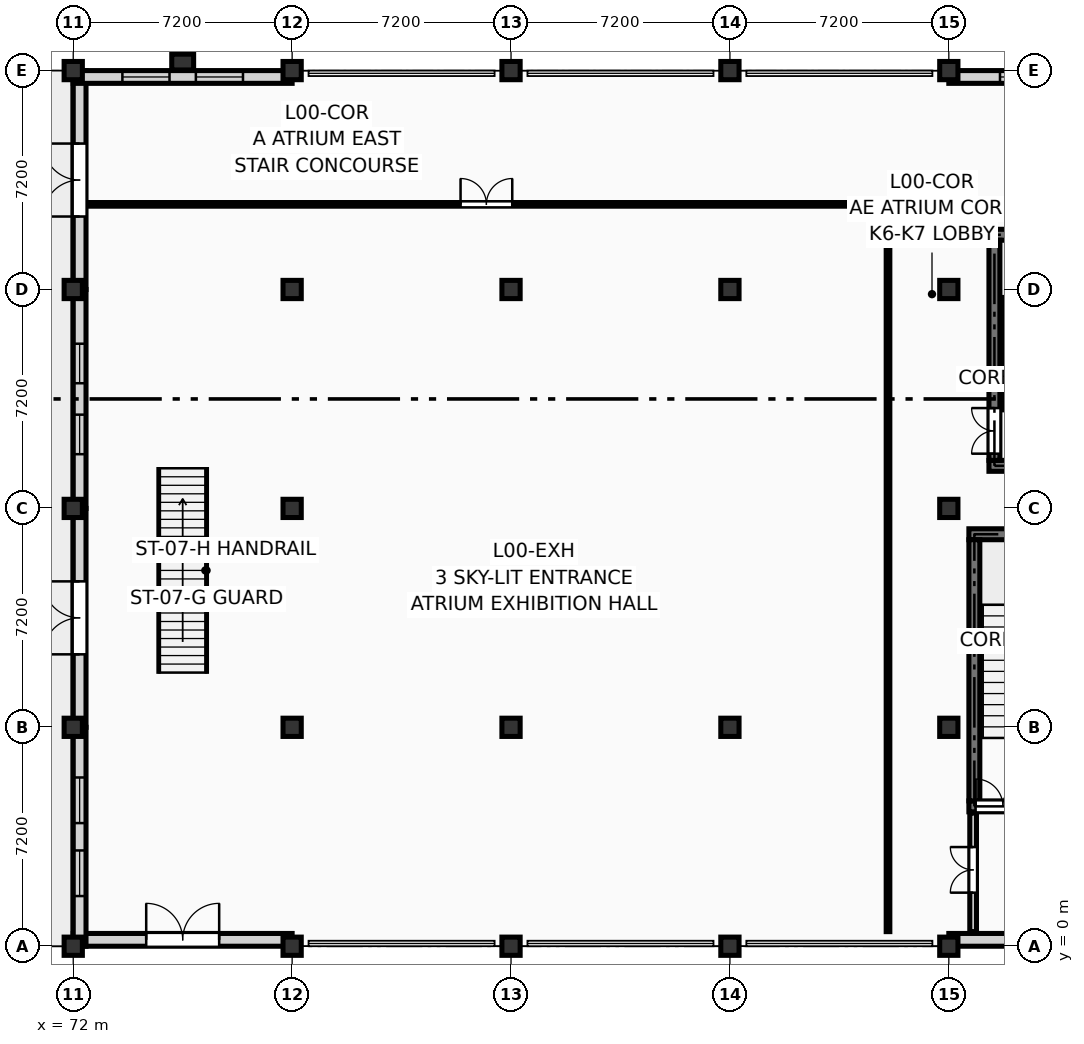
"""IFC4 building model, lengths in metres.
Left out: names, types, materials, properties, quantities, classifications, styles, units other than length and angle.
Written with IfcOpenShell. Run it as: python <this file> out.ifc"""

import sys

from ifc_helpers import new_model, si_unit, direction, frame, frame_2d, origin, origin_2d, place, context, subcontext, project, spatial, rectangle, extrude, element, fill, save


model = new_model("IFC4")
c1 = context("Model", 3, precision=1e-05, world=origin(), true_north=direction((0.0, 1.0)))
c2 = subcontext(c1, "Body", "Model", "MODEL_VIEW")
j1 = project(units=[si_unit("LENGTHUNIT", "METRE"), si_unit("PLANEANGLEUNIT", "RADIAN")], contexts=[c1])
p1 = place(None, origin())
s1 = spatial("IfcSite", under=j1, at=p1, CompositionType="ELEMENT")
p2 = place(p1, origin())
s2 = spatial("IfcBuilding", under=s1, at=p2, CompositionType="ELEMENT")
p3 = place(p2, origin())
s3 = spatial("IfcBuildingStorey", under=s2, at=p3, CompositionType="ELEMENT", Elevation=0.0)
for number, where, z_axis, x_axis in (
    (1, (72.0, 0.0, 0.0), (0.0, 0.0, 1.0), (1.0, 0.0, 0.0)),
    (2, (72.0, 7.2, 0.0), (0.0, 0.0, 1.0), (1.0, 0.0, 0.0)),
    (3, (72.0, 14.4, 0.0), (0.0, 0.0, 1.0), (1.0, 0.0, 0.0)),
    (4, (72.0, 21.6, 0.0), (0.0, 0.0, 1.0), (1.0, 0.0, 0.0)),
    (5, (72.0, 28.8, 0.0), (0.0, 0.0, 1.0), (1.0, 0.0, 0.0)),
    (6, (79.2, 0.0, 0.0), (0.0, 0.0, 1.0), (1.0, 0.0, 0.0)),
    (7, (79.2, 7.2, 0.0), (0.0, 0.0, 1.0), (1.0, 0.0, 0.0)),
    (8, (79.2, 14.4, 0.0), (0.0, 0.0, 1.0), (1.0, 0.0, 0.0)),
    (9, (79.2, 21.6, 0.0), (0.0, 0.0, 1.0), (1.0, 0.0, 0.0)),
    (10, (79.2, 28.8, 0.0), (0.0, 0.0, 1.0), (1.0, 0.0, 0.0)),
    (11, (86.4, 0.0, 0.0), (0.0, 0.0, 1.0), (1.0, 0.0, 0.0)),
    (12, (86.4, 7.2, 0.0), (0.0, 0.0, 1.0), (1.0, 0.0, 0.0)),
    (13, (86.4, 21.6, 0.0), (0.0, 0.0, 1.0), (1.0, 0.0, 0.0)),
    (14, (86.4, 28.8, 0.0), (0.0, 0.0, 1.0), (1.0, 0.0, 0.0)),
    (15, (93.6, 0.0, 0.0), (0.0, 0.0, 1.0), (1.0, 0.0, 0.0)),
    (16, (93.6, 7.2, 0.0), (0.0, 0.0, 1.0), (1.0, 0.0, 0.0)),
    (17, (93.6, 21.6, 0.0), (0.0, 0.0, 1.0), (1.0, 0.0, 0.0)),
    (18, (93.6, 28.8, 0.0), (0.0, 0.0, 1.0), (1.0, 0.0, 0.0)),
    (19, (100.8, 0.0, 0.0), (0.0, 0.0, 1.0), (1.0, 0.0, 0.0)),
    (20, (100.8, 7.2, 0.0), (0.0, 0.0, 1.0), (1.0, 0.0, 0.0)),
    (21, (100.8, 14.4, 0.0), (0.0, 0.0, 1.0), (1.0, 0.0, 0.0)),
    (22, (100.8, 21.6, 0.0), (0.0, 0.0, 1.0), (1.0, 0.0, 0.0)),
    (23, (100.8, 28.8, 0.0), (0.0, 0.0, 1.0), (1.0, 0.0, 0.0)),
):
    element("IfcColumn", number, at=place(p3, frame(where, z_axis=z_axis, x_axis=x_axis)), inside=s3, PredefinedType="COLUMN", context=c2, shape_type="SweptSolid", body=[
        extrude(rectangle(XDim=0.6, YDim=0.6, at=origin_2d()), origin(), (0.0, 0.0, 1.0), 4.5),
    ])
p4 = place(p3, frame((75.6, 29.08, 0.0), z_axis=(0.0, 0.0, 1.0), x_axis=(0.0, 1.0, 0.0)))
e24 = element("IfcColumn", 24, at=p4, inside=s3, PredefinedType="PILASTER", context=c2, shape_type="SweptSolid", body=[
    extrude(rectangle(XDim=0.52, YDim=0.72, at=origin_2d()), origin(), (0.0, 0.0, 1.0), 4.5),
])
p5 = place(p3, frame((100.8, 0.21, 0.0), z_axis=(0.0, 0.0, 1.0), x_axis=(1.0, 0.0, 0.0)))
e25 = element("IfcWall", 25, at=p5, inside=s3, PredefinedType="SOLIDWALL", context=c2, shape_type="SweptSolid", body=[
    extrude(rectangle(XDim=7.2, YDim=0.42, at=frame_2d((3.6, 0.0))), origin(), (0.0, 0.0, 1.0), 3.62),
])
p6 = place(p5, frame((2.4, 0.0, 0.0)))
e26 = element("IfcOpeningElement", 26, at=p6, cuts=e25, PredefinedType="OPENING", context=c2, shape_type="SweptSolid", body=[
    extrude(rectangle(XDim=2.4, YDim=2.6, at=frame_2d((1.2, 1.3))), frame((0.0, 0.222, 0.0), z_axis=(0.0, -1.0, 0.0), x_axis=(1.0, 0.0, 0.0)), (0.0, 0.0, 1.0), 0.444),
])
p7 = place(p3, frame((72.0, 0.21, 0.0), z_axis=(0.0, 0.0, 1.0), x_axis=(1.0, 0.0, 0.0)))
e27 = element("IfcWall", 27, at=p7, inside=s3, PredefinedType="SOLIDWALL", context=c2, shape_type="SweptSolid", body=[
    extrude(rectangle(XDim=7.2, YDim=0.42, at=frame_2d((3.6, 0.0))), origin(), (0.0, 0.0, 1.0), 3.62),
])
p8 = place(p7, frame((2.4, 0.0, 0.0)))
e28 = element("IfcOpeningElement", 28, at=p8, cuts=e27, PredefinedType="OPENING", context=c2, shape_type="SweptSolid", body=[
    extrude(rectangle(XDim=2.4, YDim=2.6, at=frame_2d((1.2, 1.3))), frame((0.0, 0.222, 0.0), z_axis=(0.0, -1.0, 0.0), x_axis=(1.0, 0.0, 0.0)), (0.0, 0.0, 1.0), 0.444),
])
p9 = place(p3, frame((72.21, 0.0, 0.0), z_axis=(0.0, 0.0, 1.0), x_axis=(0.0, 1.0, 0.0)))
e29 = element("IfcWall", 29, at=p9, inside=s3, PredefinedType="SOLIDWALL", context=c2, shape_type="SweptSolid", body=[
    extrude(rectangle(XDim=7.2, YDim=0.42, at=frame_2d((3.6, 0.0))), origin(), (0.0, 0.0, 1.0), 3.62),
])
p10 = place(p9, frame((1.65, 0.0, 0.45)))
e30 = element("IfcOpeningElement", 30, at=p10, cuts=e29, PredefinedType="OPENING", context=c2, shape_type="SweptSolid", body=[
    extrude(rectangle(XDim=1.5, YDim=2.6, at=frame_2d((0.75, 1.3))), frame((0.0, 0.222, 0.0), z_axis=(0.0, -1.0, 0.0), x_axis=(1.0, 0.0, 0.0)), (0.0, 0.0, 1.0), 0.444),
])
p11 = place(p9, frame((4.05, 0.0, 0.45)))
e31 = element("IfcOpeningElement", 31, at=p11, cuts=e29, PredefinedType="OPENING", context=c2, shape_type="SweptSolid", body=[
    extrude(rectangle(XDim=1.5, YDim=2.6, at=frame_2d((0.75, 1.3))), frame((0.0, 0.222, 0.0), z_axis=(0.0, -1.0, 0.0), x_axis=(1.0, 0.0, 0.0)), (0.0, 0.0, 1.0), 0.444),
])
p12 = place(p3, frame((72.21, 7.2, 0.0), z_axis=(0.0, 0.0, 1.0), x_axis=(0.0, 1.0, 0.0)))
e32 = element("IfcWall", 32, at=p12, inside=s3, PredefinedType="SOLIDWALL", context=c2, shape_type="SweptSolid", body=[
    extrude(rectangle(XDim=7.2, YDim=0.42, at=frame_2d((3.6, 0.0))), origin(), (0.0, 0.0, 1.0), 3.62),
])
p13 = place(p12, frame((2.4, 0.0, 0.0)))
e33 = element("IfcOpeningElement", 33, at=p13, cuts=e32, PredefinedType="OPENING", context=c2, shape_type="SweptSolid", body=[
    extrude(rectangle(XDim=2.4, YDim=2.6, at=frame_2d((1.2, 1.3))), frame((0.0, 0.222, 0.0), z_axis=(0.0, -1.0, 0.0), x_axis=(1.0, 0.0, 0.0)), (0.0, 0.0, 1.0), 0.444),
])
p14 = place(p3, frame((72.21, 14.4, 0.0), z_axis=(0.0, 0.0, 1.0), x_axis=(0.0, 1.0, 0.0)))
e34 = element("IfcWall", 34, at=p14, inside=s3, PredefinedType="SOLIDWALL", context=c2, shape_type="SweptSolid", body=[
    extrude(rectangle(XDim=7.2, YDim=0.42, at=frame_2d((3.6, 0.0))), origin(), (0.0, 0.0, 1.0), 3.62),
])
p15 = place(p14, frame((1.783, 0.0, 0.45)))
e35 = element("IfcOpeningElement", 35, at=p15, cuts=e34, PredefinedType="OPENING", context=c2, shape_type="SweptSolid", body=[
    extrude(rectangle(XDim=1.3, YDim=2.5, at=frame_2d((0.65, 1.25))), frame((0.0, 0.222, 0.0), z_axis=(0.0, -1.0, 0.0), x_axis=(1.0, 0.0, 0.0)), (0.0, 0.0, 1.0), 0.444),
])
p16 = place(p14, frame((4.117, 0.0, 0.45)))
e36 = element("IfcOpeningElement", 36, at=p16, cuts=e34, PredefinedType="OPENING", context=c2, shape_type="SweptSolid", body=[
    extrude(rectangle(XDim=1.3, YDim=2.5, at=frame_2d((0.65, 1.25))), frame((0.0, 0.222, 0.0), z_axis=(0.0, -1.0, 0.0), x_axis=(1.0, 0.0, 0.0)), (0.0, 0.0, 1.0), 0.444),
])
p17 = place(p3, frame((72.21, 21.6, 0.0), z_axis=(0.0, 0.0, 1.0), x_axis=(0.0, 1.0, 0.0)))
e37 = element("IfcWall", 37, at=p17, inside=s3, PredefinedType="SOLIDWALL", context=c2, shape_type="SweptSolid", body=[
    extrude(rectangle(XDim=7.2, YDim=0.42, at=frame_2d((3.6, 0.0))), origin(), (0.0, 0.0, 1.0), 3.62),
])
p18 = place(p17, frame((2.4, 0.0, 0.0)))
e38 = element("IfcOpeningElement", 38, at=p18, cuts=e37, PredefinedType="OPENING", context=c2, shape_type="SweptSolid", body=[
    extrude(rectangle(XDim=2.4, YDim=2.6, at=frame_2d((1.2, 1.3))), frame((0.0, 0.222, 0.0), z_axis=(0.0, -1.0, 0.0), x_axis=(1.0, 0.0, 0.0)), (0.0, 0.0, 1.0), 0.444),
])
p19 = place(p3, frame((72.0, 28.59, 0.0), z_axis=(0.0, 0.0, 1.0), x_axis=(1.0, 0.0, 0.0)))
e39 = element("IfcWall", 39, at=p19, inside=s3, PredefinedType="SOLIDWALL", context=c2, shape_type="SweptSolid", body=[
    extrude(rectangle(XDim=7.2, YDim=0.42, at=frame_2d((3.6, 0.0))), origin(), (0.0, 0.0, 1.0), 3.62),
])
p20 = place(p19, frame((1.617, 0.0, 0.45)))
e40 = element("IfcOpeningElement", 40, at=p20, cuts=e39, PredefinedType="OPENING", context=c2, shape_type="SweptSolid", body=[
    extrude(rectangle(XDim=1.55, YDim=2.55, at=frame_2d((0.775, 1.275))), frame((0.0, 0.222, 0.0), z_axis=(0.0, -1.0, 0.0), x_axis=(1.0, 0.0, 0.0)), (0.0, 0.0, 1.0), 0.444),
])
p21 = place(p19, frame((4.033, 0.0, 0.45)))
e41 = element("IfcOpeningElement", 41, at=p21, cuts=e39, PredefinedType="OPENING", context=c2, shape_type="SweptSolid", body=[
    extrude(rectangle(XDim=1.55, YDim=2.55, at=frame_2d((0.775, 1.275))), frame((0.0, 0.222, 0.0), z_axis=(0.0, -1.0, 0.0), x_axis=(1.0, 0.0, 0.0)), (0.0, 0.0, 1.0), 0.444),
])
p22 = place(p3, frame((100.8, 28.59, 0.0), z_axis=(0.0, 0.0, 1.0), x_axis=(1.0, 0.0, 0.0)))
e42 = element("IfcWall", 42, at=p22, inside=s3, PredefinedType="SOLIDWALL", context=c2, shape_type="SweptSolid", body=[
    extrude(rectangle(XDim=7.2, YDim=0.42, at=frame_2d((3.6, 0.0))), origin(), (0.0, 0.0, 1.0), 3.62),
])
p23 = place(p22, frame((1.683, 0.0, 0.45)))
e43 = element("IfcOpeningElement", 43, at=p23, cuts=e42, PredefinedType="OPENING", context=c2, shape_type="SweptSolid", body=[
    extrude(rectangle(XDim=1.45, YDim=2.5, at=frame_2d((0.725, 1.25))), frame((0.0, 0.222, 0.0), z_axis=(0.0, -1.0, 0.0), x_axis=(1.0, 0.0, 0.0)), (0.0, 0.0, 1.0), 0.444),
])
p24 = place(p22, frame((4.067, 0.0, 0.45)))
e44 = element("IfcOpeningElement", 44, at=p24, cuts=e42, PredefinedType="OPENING", context=c2, shape_type="SweptSolid", body=[
    extrude(rectangle(XDim=1.45, YDim=2.5, at=frame_2d((0.725, 1.25))), frame((0.0, 0.222, 0.0), z_axis=(0.0, -1.0, 0.0), x_axis=(1.0, 0.0, 0.0)), (0.0, 0.0, 1.0), 0.444),
])
for number, where, z_axis, x_axis in (
    (45, (102.12, 15.8, 0.0), (0.0, 0.0, 1.0), (1.0, 0.0, 0.0)),
    (46, (102.12, 23.4, 0.0), (0.0, 0.0, 1.0), (1.0, 0.0, 0.0)),
):
    element("IfcWall", number, at=place(p3, frame(where, z_axis=z_axis, x_axis=x_axis)), inside=s3, PredefinedType="SHEAR", context=c2, shape_type="SweptSolid", body=[
        extrude(rectangle(XDim=4.48, YDim=0.36, at=frame_2d((2.24, 0.0))), origin(), (0.0, 0.0, 1.0), 4.25),
    ])
p25 = place(p3, frame((102.3, 15.98, 0.0), z_axis=(0.0, 0.0, 1.0), x_axis=(0.0, 1.0, 0.0)))
e47 = element("IfcWall", 47, at=p25, inside=s3, PredefinedType="SHEAR", context=c2, shape_type="SweptSolid", body=[
    extrude(rectangle(XDim=7.24, YDim=0.36, at=frame_2d((3.62, 0.0))), origin(), (0.0, 0.0, 1.0), 4.25),
])
p26 = place(p25, frame((0.22, 0.0, 0.0)))
e48 = element("IfcOpeningElement", 48, at=p26, cuts=e47, PredefinedType="OPENING", context=c2, shape_type="SweptSolid", body=[
    extrude(rectangle(XDim=1.5, YDim=2.2, at=frame_2d((0.75, 1.1))), frame((0.0, 0.192, 0.0), z_axis=(0.0, -1.0, 0.0), x_axis=(1.0, 0.0, 0.0)), (0.0, 0.0, 1.0), 0.384),
])
p27 = place(p3, frame((101.46, 4.6, 0.0), z_axis=(0.0, 0.0, 1.0), x_axis=(1.0, 0.0, 0.0)))
e49 = element("IfcWall", 49, at=p27, inside=s3, PredefinedType="SHEAR", context=c2, shape_type="SweptSolid", body=[
    extrude(rectangle(XDim=5.88, YDim=0.36, at=frame_2d((2.94, 0.0))), origin(), (0.0, 0.0, 1.0), 4.25),
])
p28 = place(p27, frame((0.22, 0.0, 0.0)))
e50 = element("IfcOpeningElement", 50, at=p28, cuts=e49, PredefinedType="OPENING", context=c2, shape_type="SweptSolid", body=[
    extrude(rectangle(XDim=1.8, YDim=2.2, at=frame_2d((0.9, 1.1))), frame((0.0, 0.192, 0.0), z_axis=(0.0, -1.0, 0.0), x_axis=(1.0, 0.0, 0.0)), (0.0, 0.0, 1.0), 0.384),
])
p29 = place(p3, frame((101.46, 13.55, 0.0), z_axis=(0.0, 0.0, 1.0), x_axis=(1.0, 0.0, 0.0)))
e51 = element("IfcWall", 51, at=p29, inside=s3, PredefinedType="SHEAR", context=c2, shape_type="SweptSolid", body=[
    extrude(rectangle(XDim=5.88, YDim=0.36, at=frame_2d((2.94, 0.0))), origin(), (0.0, 0.0, 1.0), 4.25),
])
p30 = place(p3, frame((101.64, 4.78, 0.0), z_axis=(0.0, 0.0, 1.0), x_axis=(0.0, 1.0, 0.0)))
e52 = element("IfcWall", 52, at=p30, inside=s3, PredefinedType="SHEAR", context=c2, shape_type="SweptSolid", body=[
    extrude(rectangle(XDim=8.59, YDim=0.36, at=frame_2d((4.295, 0.0))), origin(), (0.0, 0.0, 1.0), 4.25),
])
p31 = place(p3, frame((98.8, 0.48, 0.0), z_axis=(0.0, 0.0, 1.0), x_axis=(0.0, 1.0, 0.0)))
e53 = element("IfcWall", 53, at=p31, inside=s3, PredefinedType="PARTITIONING", context=c2, shape_type="SweptSolid", body=[
    extrude(rectangle(XDim=23.84, YDim=0.12, at=frame_2d((11.92, 0.0))), origin(), (0.0, 0.0, 1.0), 4.235),
])
p32 = place(p3, frame((72.46, 24.4, 0.0), z_axis=(0.0, 0.0, 1.0), x_axis=(1.0, 0.0, 0.0)))
e54 = element("IfcWall", 54, at=p32, inside=s3, PredefinedType="PARTITIONING", context=c2, shape_type="SweptSolid", body=[
    extrude(rectangle(XDim=26.26, YDim=0.12, at=frame_2d((13.13, 0.0))), origin(), (0.0, 0.0, 1.0), 4.235),
])
p33 = place(p32, frame((12.28, 0.0, 0.0)))
e55 = element("IfcOpeningElement", 55, at=p33, cuts=e54, PredefinedType="OPENING", context=c2, shape_type="SweptSolid", body=[
    extrude(rectangle(XDim=1.7, YDim=2.28, at=frame_2d((0.85, 1.14))), frame((0.0, 0.072, 0.0), z_axis=(0.0, -1.0, 0.0), x_axis=(1.0, 0.0, 0.0)), (0.0, 0.0, 1.0), 0.144),
])
p34 = place(p3, frame((101.6, 0.48, 0.0), z_axis=(0.0, 0.0, 1.0), x_axis=(0.0, 1.0, 0.0)))
e56 = element("IfcWall", 56, at=p34, inside=s3, PredefinedType="PARTITIONING", context=c2, shape_type="SweptSolid", body=[
    extrude(rectangle(XDim=3.9, YDim=0.22, at=frame_2d((1.95, 0.0))), origin(), (0.0, 0.0, 1.0), 4.235),
])
p35 = place(p34, frame((1.282, 0.0, 0.0)))
e57 = element("IfcOpeningElement", 57, at=p35, cuts=e56, PredefinedType="OPENING", context=c2, shape_type="SweptSolid", body=[
    extrude(rectangle(XDim=1.5, YDim=2.25, at=frame_2d((0.75, 1.125))), frame((0.0, 0.122, 0.0), z_axis=(0.0, -1.0, 0.0), x_axis=(1.0, 0.0, 0.0)), (0.0, 0.0, 1.0), 0.244),
])
p36 = place(p8, origin())
e58 = element("IfcDoor", 58, at=p36, inside=s3, OperationType="DOUBLE_DOOR_SINGLE_SWING", PredefinedType="DOOR", context=c2, shape_type="SweptSolid", body=[
    extrude(rectangle(XDim=2.4, YDim=2.6, at=frame_2d((1.2, 1.3))), frame((0.0, 0.025, 0.0), z_axis=(0.0, -1.0, 0.0), x_axis=(1.0, 0.0, 0.0)), (0.0, 0.0, 1.0), 0.05),
])
fill(e28, e58)
p37 = place(p10, origin())
e59 = element("IfcWindow", 59, at=p37, inside=s3, PartitioningType="SINGLE_PANEL", PredefinedType="WINDOW", context=c2, shape_type="SweptSolid", body=[
    extrude(rectangle(XDim=1.5, YDim=2.6, at=frame_2d((0.75, 1.3))), frame((0.0, 0.03, 0.0), z_axis=(0.0, -1.0, 0.0), x_axis=(1.0, 0.0, 0.0)), (0.0, 0.0, 1.0), 0.06),
])
fill(e30, e59)
p38 = place(p11, origin())
e60 = element("IfcWindow", 60, at=p38, inside=s3, PartitioningType="SINGLE_PANEL", PredefinedType="WINDOW", context=c2, shape_type="SweptSolid", body=[
    extrude(rectangle(XDim=1.5, YDim=2.6, at=frame_2d((0.75, 1.3))), frame((0.0, 0.03, 0.0), z_axis=(0.0, -1.0, 0.0), x_axis=(1.0, 0.0, 0.0)), (0.0, 0.0, 1.0), 0.06),
])
fill(e31, e60)
p39 = place(p13, origin())
e61 = element("IfcDoor", 61, at=p39, inside=s3, OperationType="DOUBLE_DOOR_SINGLE_SWING", PredefinedType="DOOR", context=c2, shape_type="SweptSolid", body=[
    extrude(rectangle(XDim=2.4, YDim=2.6, at=frame_2d((1.2, 1.3))), frame((0.0, 0.025, 0.0), z_axis=(0.0, -1.0, 0.0), x_axis=(1.0, 0.0, 0.0)), (0.0, 0.0, 1.0), 0.05),
])
fill(e33, e61)
p40 = place(p15, origin())
e62 = element("IfcWindow", 62, at=p40, inside=s3, PartitioningType="SINGLE_PANEL", PredefinedType="WINDOW", context=c2, shape_type="SweptSolid", body=[
    extrude(rectangle(XDim=1.3, YDim=2.5, at=frame_2d((0.65, 1.25))), frame((0.0, 0.03, 0.0), z_axis=(0.0, -1.0, 0.0), x_axis=(1.0, 0.0, 0.0)), (0.0, 0.0, 1.0), 0.06),
])
fill(e35, e62)
p41 = place(p16, origin())
e63 = element("IfcWindow", 63, at=p41, inside=s3, PartitioningType="SINGLE_PANEL", PredefinedType="WINDOW", context=c2, shape_type="SweptSolid", body=[
    extrude(rectangle(XDim=1.3, YDim=2.5, at=frame_2d((0.65, 1.25))), frame((0.0, 0.03, 0.0), z_axis=(0.0, -1.0, 0.0), x_axis=(1.0, 0.0, 0.0)), (0.0, 0.0, 1.0), 0.06),
])
fill(e36, e63)
p42 = place(p18, origin())
e64 = element("IfcDoor", 64, at=p42, inside=s3, OperationType="DOUBLE_DOOR_SINGLE_SWING", PredefinedType="DOOR", context=c2, shape_type="SweptSolid", body=[
    extrude(rectangle(XDim=2.4, YDim=2.6, at=frame_2d((1.2, 1.3))), frame((0.0, 0.025, 0.0), z_axis=(0.0, -1.0, 0.0), x_axis=(1.0, 0.0, 0.0)), (0.0, 0.0, 1.0), 0.05),
])
fill(e38, e64)
p43 = place(p20, origin())
e65 = element("IfcWindow", 65, at=p43, inside=s3, PartitioningType="SINGLE_PANEL", PredefinedType="WINDOW", context=c2, shape_type="SweptSolid", body=[
    extrude(rectangle(XDim=1.55, YDim=2.55, at=frame_2d((0.775, 1.275))), frame((0.0, 0.03, 0.0), z_axis=(0.0, -1.0, 0.0), x_axis=(1.0, 0.0, 0.0)), (0.0, 0.0, 1.0), 0.06),
])
fill(e40, e65)
p44 = place(p21, origin())
e66 = element("IfcWindow", 66, at=p44, inside=s3, PartitioningType="SINGLE_PANEL", PredefinedType="WINDOW", context=c2, shape_type="SweptSolid", body=[
    extrude(rectangle(XDim=1.55, YDim=2.55, at=frame_2d((0.775, 1.275))), frame((0.0, 0.03, 0.0), z_axis=(0.0, -1.0, 0.0), x_axis=(1.0, 0.0, 0.0)), (0.0, 0.0, 1.0), 0.06),
])
fill(e41, e66)
p45 = place(p23, origin())
e67 = element("IfcWindow", 67, at=p45, inside=s3, PartitioningType="SINGLE_PANEL", PredefinedType="WINDOW", context=c2, shape_type="SweptSolid", body=[
    extrude(rectangle(XDim=1.45, YDim=2.5, at=frame_2d((0.725, 1.25))), frame((0.0, 0.03, 0.0), z_axis=(0.0, -1.0, 0.0), x_axis=(1.0, 0.0, 0.0)), (0.0, 0.0, 1.0), 0.06),
])
fill(e43, e67)
p46 = place(p26, origin())
e68 = element("IfcDoor", 68, at=p46, inside=s3, OperationType="DOUBLE_DOOR_SINGLE_SWING", PredefinedType="DOOR", context=c2, shape_type="SweptSolid", body=[
    extrude(rectangle(XDim=1.5, YDim=2.2, at=frame_2d((0.75, 1.1))), frame((0.0, 0.025, 0.0), z_axis=(0.0, -1.0, 0.0), x_axis=(1.0, 0.0, 0.0)), (0.0, 0.0, 1.0), 0.05),
])
fill(e48, e68)
p47 = place(p28, origin())
e69 = element("IfcDoor", 69, at=p47, inside=s3, OperationType="DOUBLE_DOOR_SINGLE_SWING", PredefinedType="DOOR", context=c2, shape_type="SweptSolid", body=[
    extrude(rectangle(XDim=1.8, YDim=2.2, at=frame_2d((0.9, 1.1))), frame((0.0, 0.025, 0.0), z_axis=(0.0, -1.0, 0.0), x_axis=(1.0, 0.0, 0.0)), (0.0, 0.0, 1.0), 0.05),
])
fill(e50, e69)
p48 = place(p33, origin())
e70 = element("IfcDoor", 70, at=p48, inside=s3, OperationType="DOUBLE_DOOR_SINGLE_SWING", PredefinedType="DOOR", context=c2, shape_type="SweptSolid", body=[
    extrude(rectangle(XDim=1.7, YDim=2.28, at=frame_2d((0.85, 1.14))), frame((0.0, 0.025, 0.0), z_axis=(0.0, -1.0, 0.0), x_axis=(1.0, 0.0, 0.0)), (0.0, 0.0, 1.0), 0.05),
])
fill(e55, e70)
p49 = place(p35, origin())
e71 = element("IfcDoor", 71, at=p49, inside=s3, OperationType="DOUBLE_DOOR_SINGLE_SWING", PredefinedType="DOOR", context=c2, shape_type="SweptSolid", body=[
    extrude(rectangle(XDim=1.5, YDim=2.25, at=frame_2d((0.75, 1.125))), frame((0.0, 0.025, 0.0), z_axis=(0.0, -1.0, 0.0), x_axis=(1.0, 0.0, 0.0)), (0.0, 0.0, 1.0), 0.05),
])
fill(e57, e71)
save(model, sys.argv[1])
